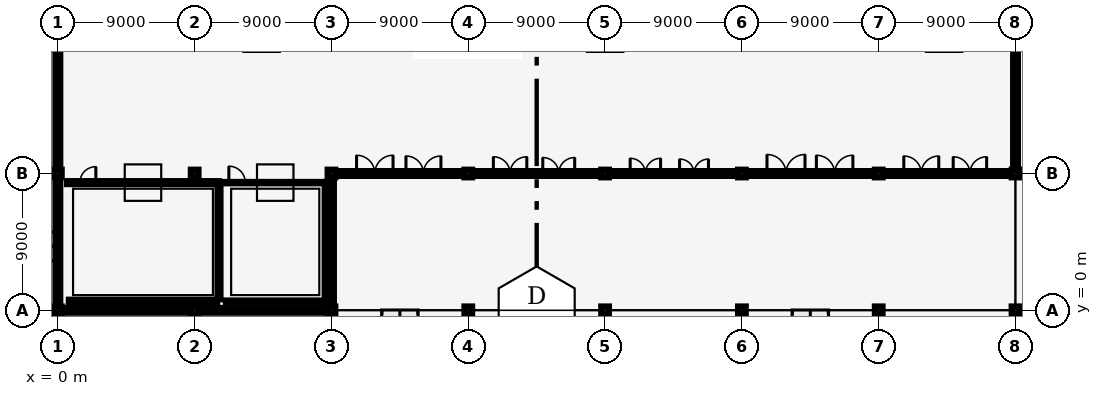
"""IFC4 building model, lengths in metres.
Left out: names, types, materials, properties, quantities, classifications, styles, units other than length and angle.
Written with IfcOpenShell. Run it as: python <this file> out.ifc"""

import sys

from ifc_helpers import new_model, si_unit, direction, frame, frame_2d, origin, origin_2d, place, context, subcontext, project, spatial, rectangle, hollow_circle, extrude, element, fill, save


model = new_model("IFC4")
c1 = context("Model", 3, precision=1e-05, world=origin(), true_north=direction((0.0, 1.0)))
c2 = subcontext(c1, "Body", "Model", "MODEL_VIEW")
j1 = project(units=[si_unit("LENGTHUNIT", "METRE"), si_unit("PLANEANGLEUNIT", "RADIAN")], contexts=[c1])
p1 = place(None, origin())
s1 = spatial("IfcSite", under=j1, at=p1, CompositionType="ELEMENT")
p2 = place(p1, origin())
s2 = spatial("IfcBuilding", under=s1, at=p2, CompositionType="ELEMENT")
p3 = place(p2, origin())
s3 = spatial("IfcBuildingStorey", under=s2, at=p3, CompositionType="ELEMENT", Elevation=0.0)
for number, where, z_axis, x_axis in (
    (1, (0.0, 0.0, 0.0), (0.0, 0.0, 1.0), (1.0, 0.0, 0.0)),
    (2, (0.0, 9.0, 0.0), (0.0, 0.0, 1.0), (1.0, 0.0, 0.0)),
    (3, (9.0, 0.0, 0.0), (0.0, 0.0, 1.0), (1.0, 0.0, 0.0)),
    (4, (9.0, 9.0, 0.0), (0.0, 0.0, 1.0), (1.0, 0.0, 0.0)),
    (5, (18.0, 0.0, 0.0), (0.0, 0.0, 1.0), (1.0, 0.0, 0.0)),
    (6, (18.0, 9.0, 0.0), (0.0, 0.0, 1.0), (1.0, 0.0, 0.0)),
    (7, (27.0, 0.0, 0.0), (0.0, 0.0, 1.0), (1.0, 0.0, 0.0)),
    (8, (27.0, 9.0, 0.0), (0.0, 0.0, 1.0), (1.0, 0.0, 0.0)),
    (9, (36.0, 0.0, 0.0), (0.0, 0.0, 1.0), (1.0, 0.0, 0.0)),
    (10, (36.0, 9.0, 0.0), (0.0, 0.0, 1.0), (1.0, 0.0, 0.0)),
    (11, (45.0, 0.0, 0.0), (0.0, 0.0, 1.0), (1.0, 0.0, 0.0)),
    (12, (45.0, 9.0, 0.0), (0.0, 0.0, 1.0), (1.0, 0.0, 0.0)),
    (13, (54.0, 0.0, 0.0), (0.0, 0.0, 1.0), (1.0, 0.0, 0.0)),
    (14, (54.0, 9.0, 0.0), (0.0, 0.0, 1.0), (1.0, 0.0, 0.0)),
    (15, (63.0, 0.0, 0.0), (0.0, 0.0, 1.0), (1.0, 0.0, 0.0)),
    (16, (63.0, 9.0, 0.0), (0.0, 0.0, 1.0), (1.0, 0.0, 0.0)),
):
    element("IfcColumn", number, at=place(p3, frame(where, z_axis=z_axis, x_axis=x_axis)), inside=s3, PredefinedType="COLUMN", context=c2, shape_type="SweptSolid", body=[
        extrude(hollow_circle(Radius=0.254, WallThickness=0.02, at=origin_2d()), origin(), (0.0, 0.0, 1.0), 6.0),
    ])
p4 = place(p3, frame((18.249, 9.0, 0.0), z_axis=(0.0, 0.0, 1.0), x_axis=(1.0, 0.0, 0.0)))
e17 = element("IfcWall", 17, at=p4, inside=s3, PredefinedType="SOLIDWALL", context=c2, shape_type="SweptSolid", body=[
    extrude(rectangle(XDim=8.502, YDim=0.32, at=frame_2d((4.251, 0.0))), origin(), (0.0, 0.0, 1.0), 4.95),
])
p5 = place(p4, frame((1.401, 0.0, 0.0)))
e18 = element("IfcOpeningElement", 18, at=p5, cuts=e17, PredefinedType="OPENING", context=c2, shape_type="SweptSolid", body=[
    extrude(rectangle(XDim=2.4, YDim=2.45, at=frame_2d((1.2, 1.225))), frame((0.0, 0.17, 0.0), z_axis=(0.0, -1.0, 0.0), x_axis=(1.0, 0.0, 0.0)), (0.0, 0.0, 1.0), 0.34),
])
p6 = place(p4, frame((4.651, 0.0, 0.0)))
e19 = element("IfcOpeningElement", 19, at=p6, cuts=e17, PredefinedType="OPENING", context=c2, shape_type="SweptSolid", body=[
    extrude(rectangle(XDim=2.3, YDim=2.4, at=frame_2d((1.15, 1.2))), frame((0.0, 0.17, 0.0), z_axis=(0.0, -1.0, 0.0), x_axis=(1.0, 0.0, 0.0)), (0.0, 0.0, 1.0), 0.34),
])
p7 = place(p3, frame((27.249, 9.0, 0.0), z_axis=(0.0, 0.0, 1.0), x_axis=(1.0, 0.0, 0.0)))
e20 = element("IfcWall", 20, at=p7, inside=s3, PredefinedType="SOLIDWALL", context=c2, shape_type="SweptSolid", body=[
    extrude(rectangle(XDim=8.502, YDim=0.32, at=frame_2d((4.251, 0.0))), origin(), (0.0, 0.0, 1.0), 4.95),
])
p8 = place(p7, frame((1.401, 0.0, 0.0)))
e21 = element("IfcOpeningElement", 21, at=p8, cuts=e20, PredefinedType="OPENING", context=c2, shape_type="SweptSolid", body=[
    extrude(rectangle(XDim=2.2, YDim=2.35, at=frame_2d((1.1, 1.175))), frame((0.0, 0.17, 0.0), z_axis=(0.0, -1.0, 0.0), x_axis=(1.0, 0.0, 0.0)), (0.0, 0.0, 1.0), 0.34),
])
p9 = place(p7, frame((4.651, 0.0, 0.0)))
e22 = element("IfcOpeningElement", 22, at=p9, cuts=e20, PredefinedType="OPENING", context=c2, shape_type="SweptSolid", body=[
    extrude(rectangle(XDim=2.1, YDim=2.3, at=frame_2d((1.05, 1.15))), frame((0.0, 0.17, 0.0), z_axis=(0.0, -1.0, 0.0), x_axis=(1.0, 0.0, 0.0)), (0.0, 0.0, 1.0), 0.34),
])
p10 = place(p3, frame((36.249, 9.0, 0.0), z_axis=(0.0, 0.0, 1.0), x_axis=(1.0, 0.0, 0.0)))
e23 = element("IfcWall", 23, at=p10, inside=s3, PredefinedType="SOLIDWALL", context=c2, shape_type="SweptSolid", body=[
    extrude(rectangle(XDim=8.502, YDim=0.32, at=frame_2d((4.251, 0.0))), origin(), (0.0, 0.0, 1.0), 4.95),
])
p11 = place(p10, frame((1.401, 0.0, 0.0)))
e24 = element("IfcOpeningElement", 24, at=p11, cuts=e23, PredefinedType="OPENING", context=c2, shape_type="SweptSolid", body=[
    extrude(rectangle(XDim=2.0, YDim=2.25, at=frame_2d((1.0, 1.125))), frame((0.0, 0.17, 0.0), z_axis=(0.0, -1.0, 0.0), x_axis=(1.0, 0.0, 0.0)), (0.0, 0.0, 1.0), 0.34),
])
p12 = place(p10, frame((4.651, 0.0, 0.0)))
e25 = element("IfcOpeningElement", 25, at=p12, cuts=e23, PredefinedType="OPENING", context=c2, shape_type="SweptSolid", body=[
    extrude(rectangle(XDim=1.9, YDim=2.2, at=frame_2d((0.95, 1.1))), frame((0.0, 0.17, 0.0), z_axis=(0.0, -1.0, 0.0), x_axis=(1.0, 0.0, 0.0)), (0.0, 0.0, 1.0), 0.34),
])
p13 = place(p3, frame((45.249, 9.0, 0.0), z_axis=(0.0, 0.0, 1.0), x_axis=(1.0, 0.0, 0.0)))
e26 = element("IfcWall", 26, at=p13, inside=s3, PredefinedType="SOLIDWALL", context=c2, shape_type="SweptSolid", body=[
    extrude(rectangle(XDim=8.502, YDim=0.32, at=frame_2d((4.251, 0.0))), origin(), (0.0, 0.0, 1.0), 4.95),
])
p14 = place(p13, frame((1.401, 0.0, 0.0)))
e27 = element("IfcOpeningElement", 27, at=p14, cuts=e26, PredefinedType="OPENING", context=c2, shape_type="SweptSolid", body=[
    extrude(rectangle(XDim=2.5, YDim=2.5, at=frame_2d((1.25, 1.25))), frame((0.0, 0.17, 0.0), z_axis=(0.0, -1.0, 0.0), x_axis=(1.0, 0.0, 0.0)), (0.0, 0.0, 1.0), 0.34),
])
p15 = place(p13, frame((4.651, 0.0, 0.0)))
e28 = element("IfcOpeningElement", 28, at=p15, cuts=e26, PredefinedType="OPENING", context=c2, shape_type="SweptSolid", body=[
    extrude(rectangle(XDim=2.4, YDim=2.45, at=frame_2d((1.2, 1.225))), frame((0.0, 0.17, 0.0), z_axis=(0.0, -1.0, 0.0), x_axis=(1.0, 0.0, 0.0)), (0.0, 0.0, 1.0), 0.34),
])
p16 = place(p3, frame((54.249, 9.0, 0.0), z_axis=(0.0, 0.0, 1.0), x_axis=(1.0, 0.0, 0.0)))
e29 = element("IfcWall", 29, at=p16, inside=s3, PredefinedType="SOLIDWALL", context=c2, shape_type="SweptSolid", body=[
    extrude(rectangle(XDim=8.502, YDim=0.32, at=frame_2d((4.251, 0.0))), origin(), (0.0, 0.0, 1.0), 4.95),
])
p17 = place(p16, frame((1.401, 0.0, 0.0)))
e30 = element("IfcOpeningElement", 30, at=p17, cuts=e29, PredefinedType="OPENING", context=c2, shape_type="SweptSolid", body=[
    extrude(rectangle(XDim=2.3, YDim=2.4, at=frame_2d((1.15, 1.2))), frame((0.0, 0.17, 0.0), z_axis=(0.0, -1.0, 0.0), x_axis=(1.0, 0.0, 0.0)), (0.0, 0.0, 1.0), 0.34),
])
p18 = place(p16, frame((4.651, 0.0, 0.0)))
e31 = element("IfcOpeningElement", 31, at=p18, cuts=e29, PredefinedType="OPENING", context=c2, shape_type="SweptSolid", body=[
    extrude(rectangle(XDim=2.2, YDim=2.35, at=frame_2d((1.1, 1.175))), frame((0.0, 0.17, 0.0), z_axis=(0.0, -1.0, 0.0), x_axis=(1.0, 0.0, 0.0)), (0.0, 0.0, 1.0), 0.34),
])
p19 = place(p3, frame((0.249, 0.0, 0.0), z_axis=(0.0, 0.0, 1.0), x_axis=(1.0, 0.0, 0.0)))
e32 = element("IfcWall", 32, at=p19, inside=s3, PredefinedType="SOLIDWALL", context=c2, shape_type="SweptSolid", body=[
    extrude(rectangle(XDim=8.502, YDim=0.32, at=frame_2d((4.251, 0.0))), origin(), (0.0, 0.0, 1.0), 4.95),
])
p20 = place(p3, frame((9.249, 0.0, 0.0), z_axis=(0.0, 0.0, 1.0), x_axis=(1.0, 0.0, 0.0)))
e33 = element("IfcWall", 33, at=p20, inside=s3, PredefinedType="SOLIDWALL", context=c2, shape_type="SweptSolid", body=[
    extrude(rectangle(XDim=8.502, YDim=0.32, at=frame_2d((4.251, 0.0))), origin(), (0.0, 0.0, 1.0), 4.95),
])
p21 = place(p20, frame((2.751, 0.0, 0.9)))
e34 = element("IfcOpeningElement", 34, at=p21, cuts=e33, PredefinedType="OPENING", context=c2, shape_type="SweptSolid", body=[
    extrude(rectangle(XDim=2.6, YDim=2.1, at=frame_2d((1.3, 1.05))), frame((0.0, 0.17, 0.0), z_axis=(0.0, -1.0, 0.0), x_axis=(1.0, 0.0, 0.0)), (0.0, 0.0, 1.0), 0.34),
])
p22 = place(p3, frame((18.0, 0.249, 0.0), z_axis=(0.0, 0.0, 1.0), x_axis=(0.0, 1.0, 0.0)))
e35 = element("IfcWall", 35, at=p22, inside=s3, PredefinedType="SOLIDWALL", context=c2, shape_type="SweptSolid", body=[
    extrude(rectangle(XDim=8.502, YDim=0.32, at=frame_2d((4.251, 0.0))), origin(), (0.0, 0.0, 1.0), 4.95),
])
p23 = place(p3, frame((63.0, 9.249, 0.0), z_axis=(0.0, 0.0, 1.0), x_axis=(0.0, 1.0, 0.0)))
e36 = element("IfcWall", 36, at=p23, inside=s3, PredefinedType="SOLIDWALL", context=c2, shape_type="SweptSolid", body=[
    extrude(rectangle(XDim=8.349, YDim=0.32, at=frame_2d((4.174, 0.0))), origin(), (0.0, 0.0, 1.0), 4.95),
])
p24 = place(p23, frame((2.751, 0.0, 0.85)))
e37 = element("IfcOpeningElement", 37, at=p24, cuts=e36, PredefinedType="OPENING", context=c2, shape_type="SweptSolid", body=[
    extrude(rectangle(XDim=2.4, YDim=2.1, at=frame_2d((1.2, 1.05))), frame((0.0, 0.17, 0.0), z_axis=(0.0, -1.0, 0.0), x_axis=(1.0, 0.0, 0.0)), (0.0, 0.0, 1.0), 0.34),
])
p25 = place(p3, frame((0.0, 0.249, 0.0), z_axis=(0.0, 0.0, 1.0), x_axis=(0.0, 1.0, 0.0)))
e38 = element("IfcWall", 38, at=p25, inside=s3, PredefinedType="SOLIDWALL", context=c2, shape_type="SweptSolid", body=[
    extrude(rectangle(XDim=8.502, YDim=0.32, at=frame_2d((4.251, 0.0))), origin(), (0.0, 0.0, 1.0), 4.95),
])
p26 = place(p25, frame((3.001, 0.0, 0.0)))
e39 = element("IfcOpeningElement", 39, at=p26, cuts=e38, PredefinedType="OPENING", context=c2, shape_type="SweptSolid", body=[
    extrude(rectangle(XDim=1.9, YDim=2.2, at=frame_2d((0.95, 1.1))), frame((0.0, 0.17, 0.0), z_axis=(0.0, -1.0, 0.0), x_axis=(1.0, 0.0, 0.0)), (0.0, 0.0, 1.0), 0.34),
])
p27 = place(p3, frame((0.0, 9.249, 0.0), z_axis=(0.0, 0.0, 1.0), x_axis=(0.0, 1.0, 0.0)))
e40 = element("IfcWall", 40, at=p27, inside=s3, PredefinedType="SOLIDWALL", context=c2, shape_type="SweptSolid", body=[
    extrude(rectangle(XDim=8.306, YDim=0.32, at=frame_2d((4.153, 0.0))), origin(), (0.0, 0.0, 1.0), 4.95),
])
p28 = place(p27, frame((1.701, 0.0, 0.85)))
e41 = element("IfcOpeningElement", 41, at=p28, cuts=e40, PredefinedType="OPENING", context=c2, shape_type="SweptSolid", body=[
    extrude(rectangle(XDim=2.4, YDim=2.1, at=frame_2d((1.2, 1.05))), frame((0.0, 0.17, 0.0), z_axis=(0.0, -1.0, 0.0), x_axis=(1.0, 0.0, 0.0)), (0.0, 0.0, 1.0), 0.34),
])
p29 = place(p27, frame((5.101, 0.0, 0.85)))
e42 = element("IfcOpeningElement", 42, at=p29, cuts=e40, PredefinedType="OPENING", context=c2, shape_type="SweptSolid", body=[
    extrude(rectangle(XDim=2.2, YDim=2.1, at=frame_2d((1.1, 1.05))), frame((0.0, 0.17, 0.0), z_axis=(0.0, -1.0, 0.0), x_axis=(1.0, 0.0, 0.0)), (0.0, 0.0, 1.0), 0.34),
])
p30 = place(p3, frame((0.6, 8.4, 0.0), z_axis=(0.0, 0.0, 1.0), x_axis=(1.0, 0.0, 0.0)))
e43 = element("IfcWall", 43, at=p30, inside=s3, PredefinedType="SOLIDWALL", context=c2, shape_type="SweptSolid", body=[
    extrude(rectangle(XDim=10.0, YDim=0.2, at=frame_2d((5.0, 0.0))), origin(), (0.0, 0.0, 1.0), 4.85),
])
p31 = place(p30, frame((0.85, 0.0, 0.0)))
e44 = element("IfcOpeningElement", 44, at=p31, cuts=e43, PredefinedType="OPENING", context=c2, shape_type="SweptSolid", body=[
    extrude(rectangle(XDim=1.05, YDim=2.15, at=frame_2d((0.525, 1.075))), frame((0.0, 0.11, 0.0), z_axis=(0.0, -1.0, 0.0), x_axis=(1.0, 0.0, 0.0)), (0.0, 0.0, 1.0), 0.22),
])
p32 = place(p3, frame((0.72, 0.6, 0.0), z_axis=(0.0, 0.0, 1.0), x_axis=(1.0, 0.0, 0.0)))
e45 = element("IfcWall", 45, at=p32, inside=s3, PredefinedType="SOLIDWALL", context=c2, shape_type="SweptSolid", body=[
    extrude(rectangle(XDim=9.76, YDim=0.2, at=frame_2d((4.88, 0.0))), origin(), (0.0, 0.0, 1.0), 4.85),
])
p33 = place(p3, frame((10.6, 0.72, 0.0), z_axis=(0.0, 0.0, 1.0), x_axis=(0.0, 1.0, 0.0)))
e46 = element("IfcWall", 46, at=p33, inside=s3, PredefinedType="SOLIDWALL", context=c2, shape_type="SweptSolid", body=[
    extrude(rectangle(XDim=7.56, YDim=0.2, at=frame_2d((3.78, 0.0))), origin(), (0.0, 0.0, 1.0), 4.85),
])
p34 = place(p3, frame((11.0, 8.4, 0.0), z_axis=(0.0, 0.0, 1.0), x_axis=(1.0, 0.0, 0.0)))
e47 = element("IfcWall", 47, at=p34, inside=s3, PredefinedType="PARTITIONING", context=c2, shape_type="SweptSolid", body=[
    extrude(rectangle(XDim=6.6, YDim=0.095, at=frame_2d((3.3, 0.0))), origin(), (0.0, 0.0, 1.0), 4.85),
])
p35 = place(p34, frame((0.25, 0.0, 0.0)))
e48 = element("IfcOpeningElement", 48, at=p35, cuts=e47, PredefinedType="OPENING", context=c2, shape_type="SweptSolid", body=[
    extrude(rectangle(XDim=1.08, YDim=2.18, at=frame_2d((0.54, 1.09))), frame((0.0, 0.057, 0.0), z_axis=(0.0, -1.0, 0.0), x_axis=(1.0, 0.0, 0.0)), (0.0, 0.0, 1.0), 0.115),
])
p36 = place(p3, frame((11.057, 0.6, 0.0), z_axis=(0.0, 0.0, 1.0), x_axis=(1.0, 0.0, 0.0)))
e49 = element("IfcWall", 49, at=p36, inside=s3, PredefinedType="PARTITIONING", context=c2, shape_type="SweptSolid", body=[
    extrude(rectangle(XDim=6.486, YDim=0.095, at=frame_2d((3.243, 0.0))), origin(), (0.0, 0.0, 1.0), 4.85),
])
p37 = place(p3, frame((17.6, 0.657, 0.0), z_axis=(0.0, 0.0, 1.0), x_axis=(0.0, 1.0, 0.0)))
e50 = element("IfcWall", 50, at=p37, inside=s3, PredefinedType="PARTITIONING", context=c2, shape_type="SweptSolid", body=[
    extrude(rectangle(XDim=7.686, YDim=0.095, at=frame_2d((3.843, 0.0))), origin(), (0.0, 0.0, 1.0), 4.85),
])
p38 = place(p5, origin())
e51 = element("IfcDoor", 51, at=p38, inside=s3, OperationType="DOUBLE_DOOR_SINGLE_SWING", PredefinedType="DOOR", context=c2, shape_type="SweptSolid", body=[
    extrude(rectangle(XDim=2.4, YDim=2.45, at=frame_2d((1.2, 1.225))), frame((0.0, 0.025, 0.0), z_axis=(0.0, -1.0, 0.0), x_axis=(1.0, 0.0, 0.0)), (0.0, 0.0, 1.0), 0.05),
])
fill(e18, e51)
p39 = place(p6, origin())
e52 = element("IfcDoor", 52, at=p39, inside=s3, OperationType="DOUBLE_DOOR_SINGLE_SWING", PredefinedType="DOOR", context=c2, shape_type="SweptSolid", body=[
    extrude(rectangle(XDim=2.3, YDim=2.4, at=frame_2d((1.15, 1.2))), frame((0.0, 0.025, 0.0), z_axis=(0.0, -1.0, 0.0), x_axis=(1.0, 0.0, 0.0)), (0.0, 0.0, 1.0), 0.05),
])
fill(e19, e52)
p40 = place(p8, origin())
e53 = element("IfcDoor", 53, at=p40, inside=s3, OperationType="DOUBLE_DOOR_SINGLE_SWING", PredefinedType="DOOR", context=c2, shape_type="SweptSolid", body=[
    extrude(rectangle(XDim=2.2, YDim=2.35, at=frame_2d((1.1, 1.175))), frame((0.0, 0.025, 0.0), z_axis=(0.0, -1.0, 0.0), x_axis=(1.0, 0.0, 0.0)), (0.0, 0.0, 1.0), 0.05),
])
fill(e21, e53)
p41 = place(p9, origin())
e54 = element("IfcDoor", 54, at=p41, inside=s3, OperationType="DOUBLE_DOOR_SINGLE_SWING", PredefinedType="DOOR", context=c2, shape_type="SweptSolid", body=[
    extrude(rectangle(XDim=2.1, YDim=2.3, at=frame_2d((1.05, 1.15))), frame((0.0, 0.025, 0.0), z_axis=(0.0, -1.0, 0.0), x_axis=(1.0, 0.0, 0.0)), (0.0, 0.0, 1.0), 0.05),
])
fill(e22, e54)
p42 = place(p11, origin())
e55 = element("IfcDoor", 55, at=p42, inside=s3, OperationType="DOUBLE_DOOR_SINGLE_SWING", PredefinedType="DOOR", context=c2, shape_type="SweptSolid", body=[
    extrude(rectangle(XDim=2.0, YDim=2.25, at=frame_2d((1.0, 1.125))), frame((0.0, 0.025, 0.0), z_axis=(0.0, -1.0, 0.0), x_axis=(1.0, 0.0, 0.0)), (0.0, 0.0, 1.0), 0.05),
])
fill(e24, e55)
p43 = place(p12, origin())
e56 = element("IfcDoor", 56, at=p43, inside=s3, OperationType="DOUBLE_DOOR_SINGLE_SWING", PredefinedType="DOOR", context=c2, shape_type="SweptSolid", body=[
    extrude(rectangle(XDim=1.9, YDim=2.2, at=frame_2d((0.95, 1.1))), frame((0.0, 0.025, 0.0), z_axis=(0.0, -1.0, 0.0), x_axis=(1.0, 0.0, 0.0)), (0.0, 0.0, 1.0), 0.05),
])
fill(e25, e56)
p44 = place(p14, origin())
e57 = element("IfcDoor", 57, at=p44, inside=s3, OperationType="DOUBLE_DOOR_SINGLE_SWING", PredefinedType="DOOR", context=c2, shape_type="SweptSolid", body=[
    extrude(rectangle(XDim=2.5, YDim=2.5, at=frame_2d((1.25, 1.25))), frame((0.0, 0.025, 0.0), z_axis=(0.0, -1.0, 0.0), x_axis=(1.0, 0.0, 0.0)), (0.0, 0.0, 1.0), 0.05),
])
fill(e27, e57)
p45 = place(p15, origin())
e58 = element("IfcDoor", 58, at=p45, inside=s3, OperationType="DOUBLE_DOOR_SINGLE_SWING", PredefinedType="DOOR", context=c2, shape_type="SweptSolid", body=[
    extrude(rectangle(XDim=2.4, YDim=2.45, at=frame_2d((1.2, 1.225))), frame((0.0, 0.025, 0.0), z_axis=(0.0, -1.0, 0.0), x_axis=(1.0, 0.0, 0.0)), (0.0, 0.0, 1.0), 0.05),
])
fill(e28, e58)
p46 = place(p17, origin())
e59 = element("IfcDoor", 59, at=p46, inside=s3, OperationType="DOUBLE_DOOR_SINGLE_SWING", PredefinedType="DOOR", context=c2, shape_type="SweptSolid", body=[
    extrude(rectangle(XDim=2.3, YDim=2.4, at=frame_2d((1.15, 1.2))), frame((0.0, 0.025, 0.0), z_axis=(0.0, -1.0, 0.0), x_axis=(1.0, 0.0, 0.0)), (0.0, 0.0, 1.0), 0.05),
])
fill(e30, e59)
p47 = place(p18, origin())
e60 = element("IfcDoor", 60, at=p47, inside=s3, OperationType="DOUBLE_DOOR_SINGLE_SWING", PredefinedType="DOOR", context=c2, shape_type="SweptSolid", body=[
    extrude(rectangle(XDim=2.2, YDim=2.35, at=frame_2d((1.1, 1.175))), frame((0.0, 0.025, 0.0), z_axis=(0.0, -1.0, 0.0), x_axis=(1.0, 0.0, 0.0)), (0.0, 0.0, 1.0), 0.05),
])
fill(e31, e60)
p48 = place(p21, origin())
e61 = element("IfcWindow", 61, at=p48, inside=s3, PartitioningType="SINGLE_PANEL", PredefinedType="WINDOW", context=c2, shape_type="SweptSolid", body=[
    extrude(rectangle(XDim=2.6, YDim=2.1, at=frame_2d((1.3, 1.05))), frame((0.0, 0.03, 0.0), z_axis=(0.0, -1.0, 0.0), x_axis=(1.0, 0.0, 0.0)), (0.0, 0.0, 1.0), 0.06),
])
fill(e34, e61)
p49 = place(p24, origin())
e62 = element("IfcWindow", 62, at=p49, inside=s3, PartitioningType="SINGLE_PANEL", PredefinedType="WINDOW", context=c2, shape_type="SweptSolid", body=[
    extrude(rectangle(XDim=2.4, YDim=2.1, at=frame_2d((1.2, 1.05))), frame((0.0, 0.03, 0.0), z_axis=(0.0, -1.0, 0.0), x_axis=(1.0, 0.0, 0.0)), (0.0, 0.0, 1.0), 0.06),
])
fill(e37, e62)
p50 = place(p26, origin())
e63 = element("IfcDoor", 63, at=p50, inside=s3, OperationType="DOUBLE_DOOR_SINGLE_SWING", PredefinedType="DOOR", context=c2, shape_type="SweptSolid", body=[
    extrude(rectangle(XDim=1.9, YDim=2.2, at=frame_2d((0.95, 1.1))), frame((0.0, 0.025, 0.0), z_axis=(0.0, -1.0, 0.0), x_axis=(1.0, 0.0, 0.0)), (0.0, 0.0, 1.0), 0.05),
])
fill(e39, e63)
p51 = place(p28, origin())
e64 = element("IfcWindow", 64, at=p51, inside=s3, PartitioningType="SINGLE_PANEL", PredefinedType="WINDOW", context=c2, shape_type="SweptSolid", body=[
    extrude(rectangle(XDim=2.4, YDim=2.1, at=frame_2d((1.2, 1.05))), frame((0.0, 0.03, 0.0), z_axis=(0.0, -1.0, 0.0), x_axis=(1.0, 0.0, 0.0)), (0.0, 0.0, 1.0), 0.06),
])
fill(e41, e64)
p52 = place(p29, origin())
e65 = element("IfcWindow", 65, at=p52, inside=s3, PartitioningType="SINGLE_PANEL", PredefinedType="WINDOW", context=c2, shape_type="SweptSolid", body=[
    extrude(rectangle(XDim=2.2, YDim=2.1, at=frame_2d((1.1, 1.05))), frame((0.0, 0.03, 0.0), z_axis=(0.0, -1.0, 0.0), x_axis=(1.0, 0.0, 0.0)), (0.0, 0.0, 1.0), 0.06),
])
fill(e42, e65)
p53 = place(p31, origin())
e66 = element("IfcDoor", 66, at=p53, inside=s3, OperationType="SINGLE_SWING_RIGHT", PredefinedType="DOOR", context=c2, shape_type="SweptSolid", body=[
    extrude(rectangle(XDim=1.05, YDim=2.15, at=frame_2d((0.525, 1.075))), frame((0.0, 0.025, 0.0), z_axis=(0.0, -1.0, 0.0), x_axis=(1.0, 0.0, 0.0)), (0.0, 0.0, 1.0), 0.05),
])
fill(e44, e66)
p54 = place(p35, origin())
e67 = element("IfcDoor", 67, at=p54, inside=s3, OperationType="SINGLE_SWING_LEFT", PredefinedType="DOOR", context=c2, shape_type="SweptSolid", body=[
    extrude(rectangle(XDim=1.08, YDim=2.18, at=frame_2d((0.54, 1.09))), frame((0.0, 0.025, 0.0), z_axis=(0.0, -1.0, 0.0), x_axis=(1.0, 0.0, 0.0)), (0.0, 0.0, 1.0), 0.05),
])
fill(e48, e67)
save(model, sys.argv[1])
